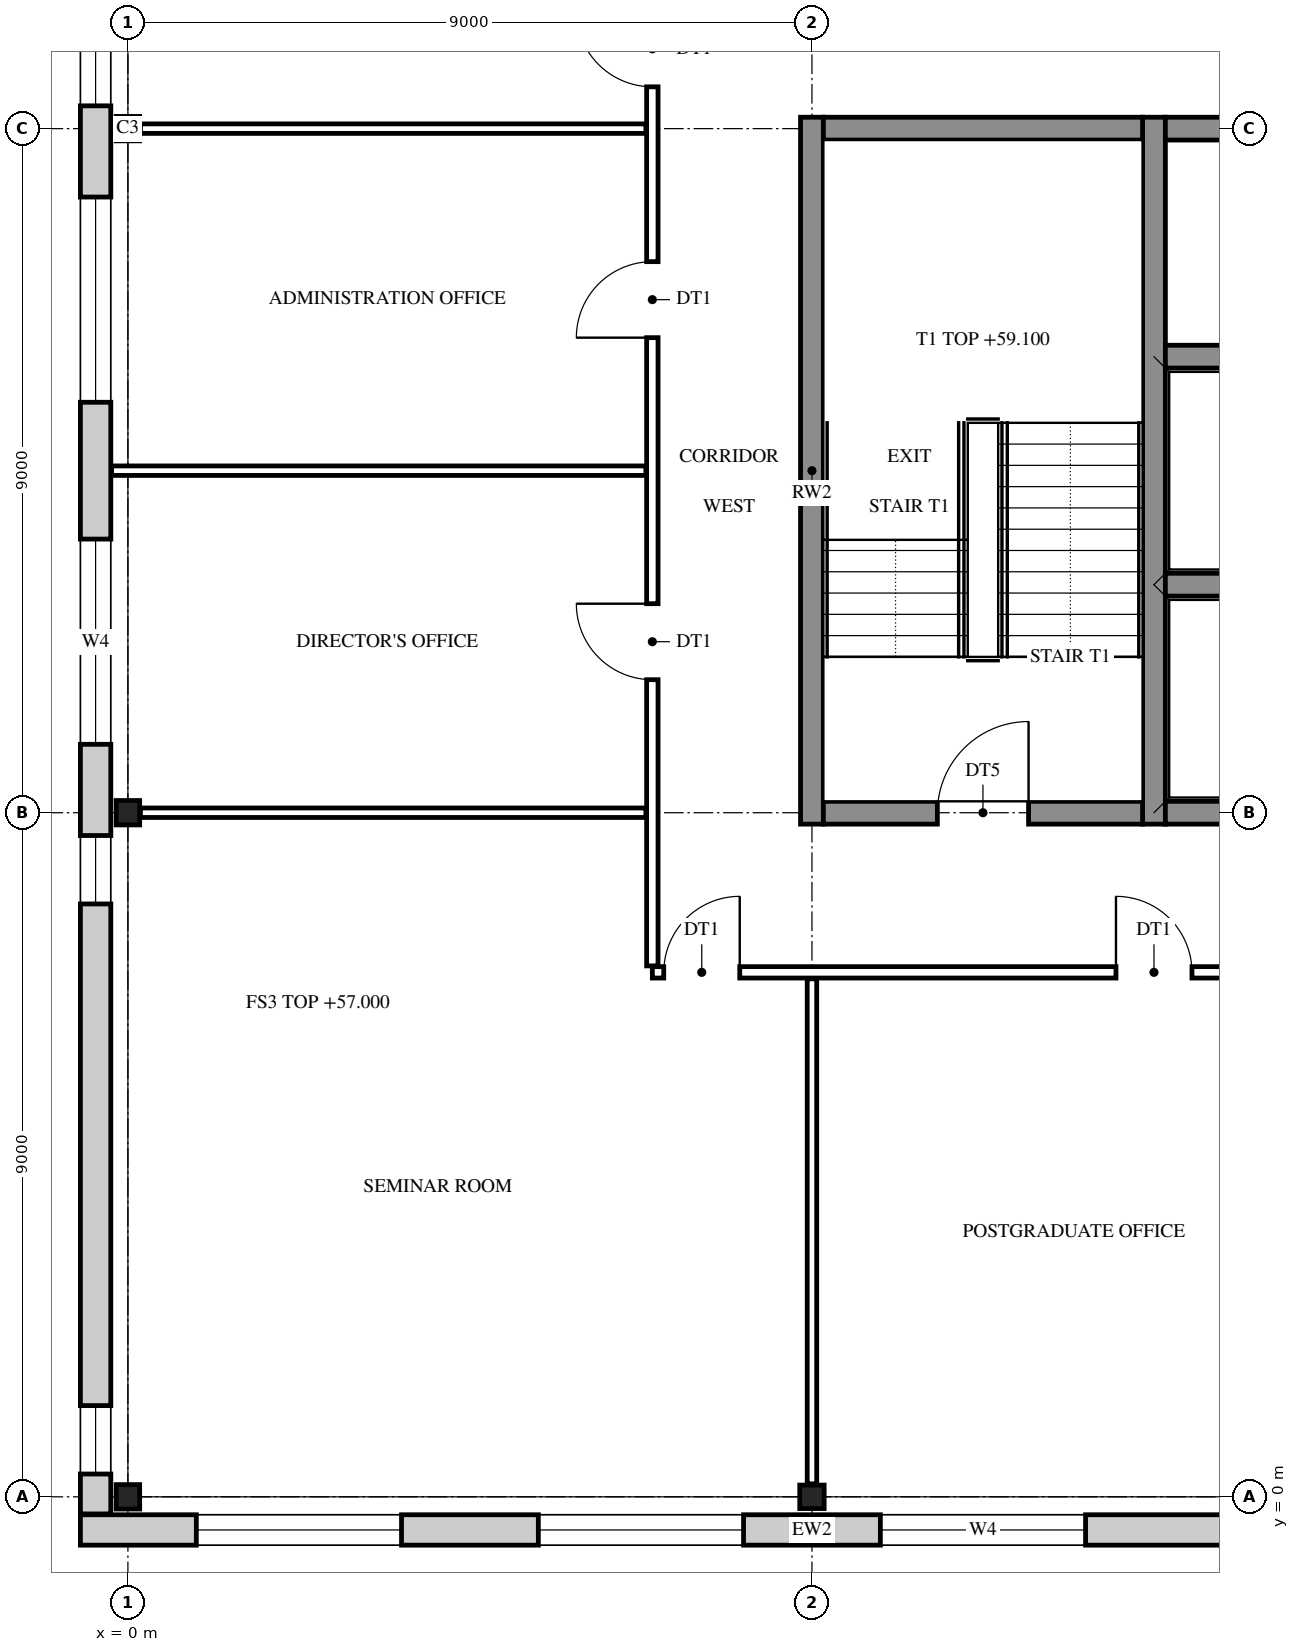
"""IFC4 building model, lengths in metres.
Left out: names, types, materials, properties, quantities, classifications, styles, units other than length and angle.
Written with IfcOpenShell. Run it as: python <this file> out.ifc"""

import sys

from ifc_helpers import new_model, si_unit, direction, frame, frame_2d, origin, origin_2d, place, context, subcontext, project, spatial, rectangle, i_section, extrude, element, fill, save


model = new_model("IFC4")
c1 = context("Model", 3, precision=1e-05, world=origin(), true_north=direction((0.0, 1.0)))
c2 = subcontext(c1, "Body", "Model", "MODEL_VIEW")
j1 = project(units=[si_unit("LENGTHUNIT", "METRE"), si_unit("PLANEANGLEUNIT", "RADIAN")], contexts=[c1])
p1 = place(None, origin())
s1 = spatial("IfcSite", under=j1, at=p1, CompositionType="ELEMENT")
p2 = place(p1, origin())
s2 = spatial("IfcBuilding", under=s1, at=p2, CompositionType="ELEMENT")
p3 = place(p2, frame((0.0, 0.0, 57.0)))
s3 = spatial("IfcBuildingStorey", under=s2, at=p3, CompositionType="ELEMENT", Elevation=57.0)
for number, where, z_axis, x_axis in (
    (1, (0.0, 0.0, 0.0), (0.0, 0.0, 1.0), (1.0, 0.0, 0.0)),
    (2, (0.0, 9.0, 0.0), (0.0, 0.0, 1.0), (1.0, 0.0, 0.0)),
    (3, (0.0, 18.0, 0.0), (0.0, 0.0, 1.0), (1.0, 0.0, 0.0)),
    (4, (9.0, 0.0, 0.0), (0.0, 0.0, 1.0), (0.0, 1.0, 0.0)),
):
    element("IfcColumn", number, at=place(p3, frame(where, z_axis=z_axis, x_axis=x_axis)), inside=s3, PredefinedType="COLUMN", context=c2, shape_type="SweptSolid", body=[
        extrude(i_section(OverallWidth=0.309, OverallDepth=0.321, WebThickness=0.014, FlangeThickness=0.022, FilletRadius=0.017, at=origin_2d()), origin(), (0.0, 0.0, 1.0), 4.2),
    ])
for number, where, z_axis, x_axis in (
    (5, (9.0, 8.85, 0.0), (0.0, 0.0, 1.0), (0.0, 1.0, 0.0)),
    (6, (13.5, 8.85, 0.0), (0.0, 0.0, 1.0), (0.0, 1.0, 0.0)),
):
    element("IfcWall", number, at=place(p3, frame(where, z_axis=z_axis, x_axis=x_axis)), inside=s3, PredefinedType="SHEAR", context=c2, shape_type="SweptSolid", body=[
        extrude(rectangle(XDim=9.3, YDim=0.3, at=frame_2d((4.65, 0.0))), origin(), (0.0, 0.0, 1.0), 4.2),
    ])
p4 = place(p3, frame((9.15, 9.0, 0.0), z_axis=(0.0, 0.0, 1.0), x_axis=(1.0, 0.0, 0.0)))
e7 = element("IfcWall", 7, at=p4, inside=s3, PredefinedType="SHEAR", context=c2, shape_type="SweptSolid", body=[
    extrude(rectangle(XDim=4.2, YDim=0.3, at=frame_2d((2.1, 0.0))), origin(), (0.0, 0.0, 1.0), 4.2),
])
p5 = place(p4, frame((1.5, 0.0, 0.0)))
e8 = element("IfcOpeningElement", 8, at=p5, cuts=e7, PredefinedType="OPENING", context=c2, shape_type="SweptSolid", body=[
    extrude(rectangle(XDim=1.2, YDim=2.1, at=frame_2d((0.6, 1.05))), frame((0.0, 0.16, 0.0), z_axis=(0.0, -1.0, 0.0), x_axis=(1.0, 0.0, 0.0)), (0.0, 0.0, 1.0), 0.32),
])
for number, where, z_axis, x_axis in (
    (9, (13.65, 9.0, 0.0), (0.0, 0.0, 1.0), (1.0, 0.0, 0.0)),
    (10, (13.65, 12.0, 0.0), (0.0, 0.0, 1.0), (1.0, 0.0, 0.0)),
    (11, (13.65, 15.0, 0.0), (0.0, 0.0, 1.0), (1.0, 0.0, 0.0)),
):
    element("IfcWall", number, at=place(p3, frame(where, z_axis=z_axis, x_axis=x_axis)), inside=s3, PredefinedType="SHEAR", context=c2, shape_type="SweptSolid", body=[
        extrude(rectangle(XDim=2.7, YDim=0.3, at=frame_2d((1.35, 0.0))), origin(), (0.0, 0.0, 1.0), 4.2),
    ])
p6 = place(p3, frame((9.15, 18.0, 0.0), z_axis=(0.0, 0.0, 1.0), x_axis=(1.0, 0.0, 0.0)))
e12 = element("IfcWall", 12, at=p6, inside=s3, PredefinedType="SHEAR", context=c2, shape_type="SweptSolid", body=[
    extrude(rectangle(XDim=4.2, YDim=0.3, at=frame_2d((2.1, 0.0))), origin(), (0.0, 0.0, 1.0), 4.2),
])
p7 = place(p3, frame((13.65, 18.0, 0.0), z_axis=(0.0, 0.0, 1.0), x_axis=(1.0, 0.0, 0.0)))
e13 = element("IfcWall", 13, at=p7, inside=s3, PredefinedType="SHEAR", context=c2, shape_type="SweptSolid", body=[
    extrude(rectangle(XDim=2.7, YDim=0.3, at=frame_2d((1.35, 0.0))), origin(), (0.0, 0.0, 1.0), 4.2),
])
p8 = place(p3, frame((32.125, -0.436, 0.0), z_axis=(0.0, 0.0, 1.0), x_axis=(-1.0, 0.0, 0.0)))
e14 = element("IfcWall", 14, at=p8, inside=s3, PredefinedType="STANDARD", context=c2, shape_type="SweptSolid", body=[
    extrude(rectangle(XDim=32.75, YDim=0.4, at=frame_2d((16.375, 0.0))), origin(), (0.0, 0.0, 1.0), 4.2),
])
p9 = place(p8, frame((28.525, 0.0, 0.9)))
e15 = element("IfcOpeningElement", 15, at=p9, cuts=e14, PredefinedType="OPENING", context=c2, shape_type="SweptSolid", body=[
    extrude(rectangle(XDim=2.7, YDim=2.5, at=frame_2d((1.35, 1.25))), frame((0.0, 0.21, 0.0), z_axis=(0.0, -1.0, 0.0), x_axis=(1.0, 0.0, 0.0)), (0.0, 0.0, 1.0), 0.42),
])
p10 = place(p8, frame((24.025, 0.0, 0.9)))
e16 = element("IfcOpeningElement", 16, at=p10, cuts=e14, PredefinedType="OPENING", context=c2, shape_type="SweptSolid", body=[
    extrude(rectangle(XDim=2.7, YDim=2.5, at=frame_2d((1.35, 1.25))), frame((0.0, 0.21, 0.0), z_axis=(0.0, -1.0, 0.0), x_axis=(1.0, 0.0, 0.0)), (0.0, 0.0, 1.0), 0.42),
])
p11 = place(p8, frame((19.525, 0.0, 0.9)))
e17 = element("IfcOpeningElement", 17, at=p11, cuts=e14, PredefinedType="OPENING", context=c2, shape_type="SweptSolid", body=[
    extrude(rectangle(XDim=2.7, YDim=2.5, at=frame_2d((1.35, 1.25))), frame((0.0, 0.21, 0.0), z_axis=(0.0, -1.0, 0.0), x_axis=(1.0, 0.0, 0.0)), (0.0, 0.0, 1.0), 0.42),
])
p12 = place(p8, frame((15.025, 0.0, 0.9)))
e18 = element("IfcOpeningElement", 18, at=p12, cuts=e14, PredefinedType="OPENING", context=c2, shape_type="SweptSolid", body=[
    extrude(rectangle(XDim=2.7, YDim=2.5, at=frame_2d((1.35, 1.25))), frame((0.0, 0.21, 0.0), z_axis=(0.0, -1.0, 0.0), x_axis=(1.0, 0.0, 0.0)), (0.0, 0.0, 1.0), 0.42),
])
p13 = place(p8, frame((10.525, 0.0, 0.9)))
e19 = element("IfcOpeningElement", 19, at=p13, cuts=e14, PredefinedType="OPENING", context=c2, shape_type="SweptSolid", body=[
    extrude(rectangle(XDim=2.7, YDim=2.5, at=frame_2d((1.35, 1.25))), frame((0.0, 0.21, 0.0), z_axis=(0.0, -1.0, 0.0), x_axis=(1.0, 0.0, 0.0)), (0.0, 0.0, 1.0), 0.42),
])
p14 = place(p8, frame((6.025, 0.0, 0.9)))
e20 = element("IfcOpeningElement", 20, at=p14, cuts=e14, PredefinedType="OPENING", context=c2, shape_type="SweptSolid", body=[
    extrude(rectangle(XDim=2.7, YDim=2.5, at=frame_2d((1.35, 1.25))), frame((0.0, 0.21, 0.0), z_axis=(0.0, -1.0, 0.0), x_axis=(1.0, 0.0, 0.0)), (0.0, 0.0, 1.0), 0.42),
])
p15 = place(p8, frame((1.525, 0.0, 0.9)))
e21 = element("IfcOpeningElement", 21, at=p15, cuts=e14, PredefinedType="OPENING", context=c2, shape_type="SweptSolid", body=[
    extrude(rectangle(XDim=2.7, YDim=2.5, at=frame_2d((1.35, 1.25))), frame((0.0, 0.21, 0.0), z_axis=(0.0, -1.0, 0.0), x_axis=(1.0, 0.0, 0.0)), (0.0, 0.0, 1.0), 0.42),
])
p16 = place(p3, frame((-0.425, -0.225, 0.0), z_axis=(0.0, 0.0, 1.0), x_axis=(0.0, 1.0, 0.0)))
e22 = element("IfcWall", 22, at=p16, inside=s3, PredefinedType="STANDARD", context=c2, shape_type="SweptSolid", body=[
    extrude(rectangle(XDim=27.45, YDim=0.4, at=frame_2d((13.725, 0.0))), origin(), (0.0, 0.0, 1.0), 4.2),
])
p17 = place(p16, frame((0.525, 0.0, 0.9)))
e23 = element("IfcOpeningElement", 23, at=p17, cuts=e22, PredefinedType="OPENING", context=c2, shape_type="SweptSolid", body=[
    extrude(rectangle(XDim=0.9, YDim=2.0, at=frame_2d((0.45, 1.0))), frame((0.0, 0.21, 0.0), z_axis=(0.0, -1.0, 0.0), x_axis=(1.0, 0.0, 0.0)), (0.0, 0.0, 1.0), 0.42),
])
p18 = place(p16, frame((8.025, 0.0, 0.9)))
e24 = element("IfcOpeningElement", 24, at=p18, cuts=e22, PredefinedType="OPENING", context=c2, shape_type="SweptSolid", body=[
    extrude(rectangle(XDim=0.9, YDim=2.0, at=frame_2d((0.45, 1.0))), frame((0.0, 0.21, 0.0), z_axis=(0.0, -1.0, 0.0), x_axis=(1.0, 0.0, 0.0)), (0.0, 0.0, 1.0), 0.42),
])
p19 = place(p16, frame((10.125, 0.0, 0.9)))
e25 = element("IfcOpeningElement", 25, at=p19, cuts=e22, PredefinedType="OPENING", context=c2, shape_type="SweptSolid", body=[
    extrude(rectangle(XDim=2.7, YDim=2.5, at=frame_2d((1.35, 1.25))), frame((0.0, 0.21, 0.0), z_axis=(0.0, -1.0, 0.0), x_axis=(1.0, 0.0, 0.0)), (0.0, 0.0, 1.0), 0.42),
])
p20 = place(p16, frame((14.625, 0.0, 0.9)))
e26 = element("IfcOpeningElement", 26, at=p20, cuts=e22, PredefinedType="OPENING", context=c2, shape_type="SweptSolid", body=[
    extrude(rectangle(XDim=2.7, YDim=2.5, at=frame_2d((1.35, 1.25))), frame((0.0, 0.21, 0.0), z_axis=(0.0, -1.0, 0.0), x_axis=(1.0, 0.0, 0.0)), (0.0, 0.0, 1.0), 0.42),
])
p21 = place(p16, frame((18.525, 0.0, 0.9)))
e27 = element("IfcOpeningElement", 27, at=p21, cuts=e22, PredefinedType="OPENING", context=c2, shape_type="SweptSolid", body=[
    extrude(rectangle(XDim=0.9, YDim=2.0, at=frame_2d((0.45, 1.0))), frame((0.0, 0.21, 0.0), z_axis=(0.0, -1.0, 0.0), x_axis=(1.0, 0.0, 0.0)), (0.0, 0.0, 1.0), 0.42),
])
p22 = place(p16, frame((26.025, 0.0, 0.9)))
e28 = element("IfcOpeningElement", 28, at=p22, cuts=e22, PredefinedType="OPENING", context=c2, shape_type="SweptSolid", body=[
    extrude(rectangle(XDim=0.9, YDim=2.0, at=frame_2d((0.45, 1.0))), frame((0.0, 0.21, 0.0), z_axis=(0.0, -1.0, 0.0), x_axis=(1.0, 0.0, 0.0)), (0.0, 0.0, 1.0), 0.42),
])
p23 = place(p3, frame((6.9, 6.985, 0.0), z_axis=(0.0, 0.0, 1.0), x_axis=(0.0, 1.0, 0.0)))
e29 = element("IfcWall", 29, at=p23, inside=s3, PredefinedType="PARTITIONING", context=c2, shape_type="SweptSolid", body=[
    extrude(rectangle(XDim=13.03, YDim=0.15, at=frame_2d((6.515, 0.0))), origin(), (0.0, 0.0, 1.0), 3.542),
])
p24 = place(p23, frame((11.565, 0.0, 0.0)))
e30 = element("IfcOpeningElement", 30, at=p24, cuts=e29, PredefinedType="OPENING", context=c2, shape_type="SweptSolid", body=[
    extrude(rectangle(XDim=1.0, YDim=2.1, at=frame_2d((0.5, 1.05))), frame((0.0, 0.085, 0.0), z_axis=(0.0, -1.0, 0.0), x_axis=(1.0, 0.0, 0.0)), (0.0, 0.0, 1.0), 0.17),
])
p25 = place(p23, frame((3.765, 0.0, 0.0)))
e31 = element("IfcOpeningElement", 31, at=p25, cuts=e29, PredefinedType="OPENING", context=c2, shape_type="SweptSolid", body=[
    extrude(rectangle(XDim=1.0, YDim=2.1, at=frame_2d((0.5, 1.05))), frame((0.0, 0.085, 0.0), z_axis=(0.0, -1.0, 0.0), x_axis=(1.0, 0.0, 0.0)), (0.0, 0.0, 1.0), 0.17),
])
p26 = place(p23, frame((8.265, 0.0, 0.0)))
e32 = element("IfcOpeningElement", 32, at=p26, cuts=e29, PredefinedType="OPENING", context=c2, shape_type="SweptSolid", body=[
    extrude(rectangle(XDim=1.0, YDim=2.1, at=frame_2d((0.5, 1.05))), frame((0.0, 0.085, 0.0), z_axis=(0.0, -1.0, 0.0), x_axis=(1.0, 0.0, 0.0)), (0.0, 0.0, 1.0), 0.17),
])
p27 = place(p3, frame((9.0, 0.17, 0.0), z_axis=(0.0, 0.0, 1.0), x_axis=(0.0, 1.0, 0.0)))
e33 = element("IfcWall", 33, at=p27, inside=s3, PredefinedType="PARTITIONING", context=c2, shape_type="SweptSolid", body=[
    extrude(rectangle(XDim=6.645, YDim=0.125, at=frame_2d((3.322, 0.0))), origin(), (0.0, 0.0, 1.0), 3.542),
])
p28 = place(p3, frame((6.9, 6.9, 0.0), z_axis=(0.0, 0.0, 1.0), x_axis=(1.0, 0.0, 0.0)))
e34 = element("IfcWall", 34, at=p28, inside=s3, PredefinedType="PARTITIONING", context=c2, shape_type="SweptSolid", body=[
    extrude(rectangle(XDim=20.1, YDim=0.15, at=frame_2d((10.05, 0.0))), origin(), (0.0, 0.0, 1.0), 3.542),
])
p29 = place(p28, frame((0.15, 0.0, 0.0)))
e35 = element("IfcOpeningElement", 35, at=p29, cuts=e34, PredefinedType="OPENING", context=c2, shape_type="SweptSolid", body=[
    extrude(rectangle(XDim=1.0, YDim=2.1, at=frame_2d((0.5, 1.05))), frame((0.0, 0.085, 0.0), z_axis=(0.0, -1.0, 0.0), x_axis=(1.0, 0.0, 0.0)), (0.0, 0.0, 1.0), 0.17),
])
p30 = place(p28, frame((6.1, 0.0, 0.0)))
e36 = element("IfcOpeningElement", 36, at=p30, cuts=e34, PredefinedType="OPENING", context=c2, shape_type="SweptSolid", body=[
    extrude(rectangle(XDim=1.0, YDim=2.1, at=frame_2d((0.5, 1.05))), frame((0.0, 0.085, 0.0), z_axis=(0.0, -1.0, 0.0), x_axis=(1.0, 0.0, 0.0)), (0.0, 0.0, 1.0), 0.17),
])
p31 = place(p28, frame((16.3, 0.0, 0.0)))
e37 = element("IfcOpeningElement", 37, at=p31, cuts=e34, PredefinedType="OPENING", context=c2, shape_type="SweptSolid", body=[
    extrude(rectangle(XDim=1.0, YDim=2.1, at=frame_2d((0.5, 1.05))), frame((0.0, 0.085, 0.0), z_axis=(0.0, -1.0, 0.0), x_axis=(1.0, 0.0, 0.0)), (0.0, 0.0, 1.0), 0.17),
])
p32 = place(p3, frame((0.165, 9.0, 0.0), z_axis=(0.0, 0.0, 1.0), x_axis=(1.0, 0.0, 0.0)))
e38 = element("IfcWall", 38, at=p32, inside=s3, PredefinedType="PARTITIONING", context=c2, shape_type="SweptSolid", body=[
    extrude(rectangle(XDim=6.65, YDim=0.125, at=frame_2d((3.325, 0.0))), origin(), (0.0, 0.0, 1.0), 3.542),
])
p33 = place(p3, frame((-0.215, 13.5, 0.0), z_axis=(0.0, 0.0, 1.0), x_axis=(1.0, 0.0, 0.0)))
e39 = element("IfcWall", 39, at=p33, inside=s3, PredefinedType="PARTITIONING", context=c2, shape_type="SweptSolid", body=[
    extrude(rectangle(XDim=7.03, YDim=0.125, at=frame_2d((3.515, 0.0))), origin(), (0.0, 0.0, 1.0), 3.542),
])
p34 = place(p3, frame((0.165, 18.0, 0.0), z_axis=(0.0, 0.0, 1.0), x_axis=(1.0, 0.0, 0.0)))
e40 = element("IfcWall", 40, at=p34, inside=s3, PredefinedType="PARTITIONING", context=c2, shape_type="SweptSolid", body=[
    extrude(rectangle(XDim=6.65, YDim=0.125, at=frame_2d((3.325, 0.0))), origin(), (0.0, 0.0, 1.0), 3.542),
])
p35 = place(p9, origin())
e41 = element("IfcWindow", 41, at=p35, inside=s3, PartitioningType="SINGLE_PANEL", PredefinedType="WINDOW", context=c2, shape_type="SweptSolid", body=[
    extrude(rectangle(XDim=2.7, YDim=2.5, at=frame_2d((1.35, 1.25))), frame((0.0, 0.03, 0.0), z_axis=(0.0, -1.0, 0.0), x_axis=(1.0, 0.0, 0.0)), (0.0, 0.0, 1.0), 0.06),
])
fill(e15, e41)
p36 = place(p10, origin())
e42 = element("IfcWindow", 42, at=p36, inside=s3, PartitioningType="SINGLE_PANEL", PredefinedType="WINDOW", context=c2, shape_type="SweptSolid", body=[
    extrude(rectangle(XDim=2.7, YDim=2.5, at=frame_2d((1.35, 1.25))), frame((0.0, 0.03, 0.0), z_axis=(0.0, -1.0, 0.0), x_axis=(1.0, 0.0, 0.0)), (0.0, 0.0, 1.0), 0.06),
])
fill(e16, e42)
p37 = place(p11, origin())
e43 = element("IfcWindow", 43, at=p37, inside=s3, PartitioningType="SINGLE_PANEL", PredefinedType="WINDOW", context=c2, shape_type="SweptSolid", body=[
    extrude(rectangle(XDim=2.7, YDim=2.5, at=frame_2d((1.35, 1.25))), frame((0.0, 0.03, 0.0), z_axis=(0.0, -1.0, 0.0), x_axis=(1.0, 0.0, 0.0)), (0.0, 0.0, 1.0), 0.06),
])
fill(e17, e43)
p38 = place(p17, origin())
e44 = element("IfcWindow", 44, at=p38, inside=s3, PartitioningType="SINGLE_PANEL", PredefinedType="WINDOW", context=c2, shape_type="SweptSolid", body=[
    extrude(rectangle(XDim=0.9, YDim=2.0, at=frame_2d((0.45, 1.0))), frame((0.0, 0.03, 0.0), z_axis=(0.0, -1.0, 0.0), x_axis=(1.0, 0.0, 0.0)), (0.0, 0.0, 1.0), 0.06),
])
fill(e23, e44)
p39 = place(p18, origin())
e45 = element("IfcWindow", 45, at=p39, inside=s3, PartitioningType="SINGLE_PANEL", PredefinedType="WINDOW", context=c2, shape_type="SweptSolid", body=[
    extrude(rectangle(XDim=0.9, YDim=2.0, at=frame_2d((0.45, 1.0))), frame((0.0, 0.03, 0.0), z_axis=(0.0, -1.0, 0.0), x_axis=(1.0, 0.0, 0.0)), (0.0, 0.0, 1.0), 0.06),
])
fill(e24, e45)
p40 = place(p19, origin())
e46 = element("IfcWindow", 46, at=p40, inside=s3, PartitioningType="SINGLE_PANEL", PredefinedType="WINDOW", context=c2, shape_type="SweptSolid", body=[
    extrude(rectangle(XDim=2.7, YDim=2.5, at=frame_2d((1.35, 1.25))), frame((0.0, 0.03, 0.0), z_axis=(0.0, -1.0, 0.0), x_axis=(1.0, 0.0, 0.0)), (0.0, 0.0, 1.0), 0.06),
])
fill(e25, e46)
p41 = place(p20, origin())
e47 = element("IfcWindow", 47, at=p41, inside=s3, PartitioningType="SINGLE_PANEL", PredefinedType="WINDOW", context=c2, shape_type="SweptSolid", body=[
    extrude(rectangle(XDim=2.7, YDim=2.5, at=frame_2d((1.35, 1.25))), frame((0.0, 0.03, 0.0), z_axis=(0.0, -1.0, 0.0), x_axis=(1.0, 0.0, 0.0)), (0.0, 0.0, 1.0), 0.06),
])
fill(e26, e47)
p42 = place(p21, origin())
e48 = element("IfcWindow", 48, at=p42, inside=s3, PartitioningType="SINGLE_PANEL", PredefinedType="WINDOW", context=c2, shape_type="SweptSolid", body=[
    extrude(rectangle(XDim=0.9, YDim=2.0, at=frame_2d((0.45, 1.0))), frame((0.0, 0.03, 0.0), z_axis=(0.0, -1.0, 0.0), x_axis=(1.0, 0.0, 0.0)), (0.0, 0.0, 1.0), 0.06),
])
fill(e27, e48)
p43 = place(p5, origin())
e49 = element("IfcDoor", 49, at=p43, inside=s3, OperationType="SINGLE_SWING_RIGHT", PredefinedType="DOOR", context=c2, shape_type="SweptSolid", body=[
    extrude(rectangle(XDim=1.2, YDim=2.1, at=frame_2d((0.6, 1.05))), frame((0.0, 0.025, 0.0), z_axis=(0.0, -1.0, 0.0), x_axis=(1.0, 0.0, 0.0)), (0.0, 0.0, 1.0), 0.05),
])
fill(e8, e49)
p44 = place(p29, frame((1.0, 0.0, 0.0), z_axis=(0.0, 0.0, 1.0), x_axis=(-1.0, 0.0, 0.0)))
e50 = element("IfcDoor", 50, at=p44, inside=s3, OperationType="SINGLE_SWING_RIGHT", PredefinedType="DOOR", context=c2, shape_type="SweptSolid", body=[
    extrude(rectangle(XDim=1.0, YDim=2.1, at=frame_2d((0.5, 1.05))), frame((0.0, 0.025, 0.0), z_axis=(0.0, -1.0, 0.0), x_axis=(1.0, 0.0, 0.0)), (0.0, 0.0, 1.0), 0.05),
])
fill(e35, e50)
p45 = place(p30, frame((1.0, 0.0, 0.0), z_axis=(0.0, 0.0, 1.0), x_axis=(-1.0, 0.0, 0.0)))
e51 = element("IfcDoor", 51, at=p45, inside=s3, OperationType="SINGLE_SWING_LEFT", PredefinedType="DOOR", context=c2, shape_type="SweptSolid", body=[
    extrude(rectangle(XDim=1.0, YDim=2.1, at=frame_2d((0.5, 1.05))), frame((0.0, 0.025, 0.0), z_axis=(0.0, -1.0, 0.0), x_axis=(1.0, 0.0, 0.0)), (0.0, 0.0, 1.0), 0.05),
])
fill(e36, e51)
p46 = place(p24, origin())
e52 = element("IfcDoor", 52, at=p46, inside=s3, OperationType="SINGLE_SWING_RIGHT", PredefinedType="DOOR", context=c2, shape_type="SweptSolid", body=[
    extrude(rectangle(XDim=1.0, YDim=2.1, at=frame_2d((0.5, 1.05))), frame((0.0, 0.025, 0.0), z_axis=(0.0, -1.0, 0.0), x_axis=(1.0, 0.0, 0.0)), (0.0, 0.0, 1.0), 0.05),
])
fill(e30, e52)
p47 = place(p25, origin())
e53 = element("IfcDoor", 53, at=p47, inside=s3, OperationType="SINGLE_SWING_RIGHT", PredefinedType="DOOR", context=c2, shape_type="SweptSolid", body=[
    extrude(rectangle(XDim=1.0, YDim=2.1, at=frame_2d((0.5, 1.05))), frame((0.0, 0.025, 0.0), z_axis=(0.0, -1.0, 0.0), x_axis=(1.0, 0.0, 0.0)), (0.0, 0.0, 1.0), 0.05),
])
fill(e31, e53)
p48 = place(p26, origin())
e54 = element("IfcDoor", 54, at=p48, inside=s3, OperationType="SINGLE_SWING_LEFT", PredefinedType="DOOR", context=c2, shape_type="SweptSolid", body=[
    extrude(rectangle(XDim=1.0, YDim=2.1, at=frame_2d((0.5, 1.05))), frame((0.0, 0.025, 0.0), z_axis=(0.0, -1.0, 0.0), x_axis=(1.0, 0.0, 0.0)), (0.0, 0.0, 1.0), 0.05),
])
fill(e32, e54)
save(model, sys.argv[1])
